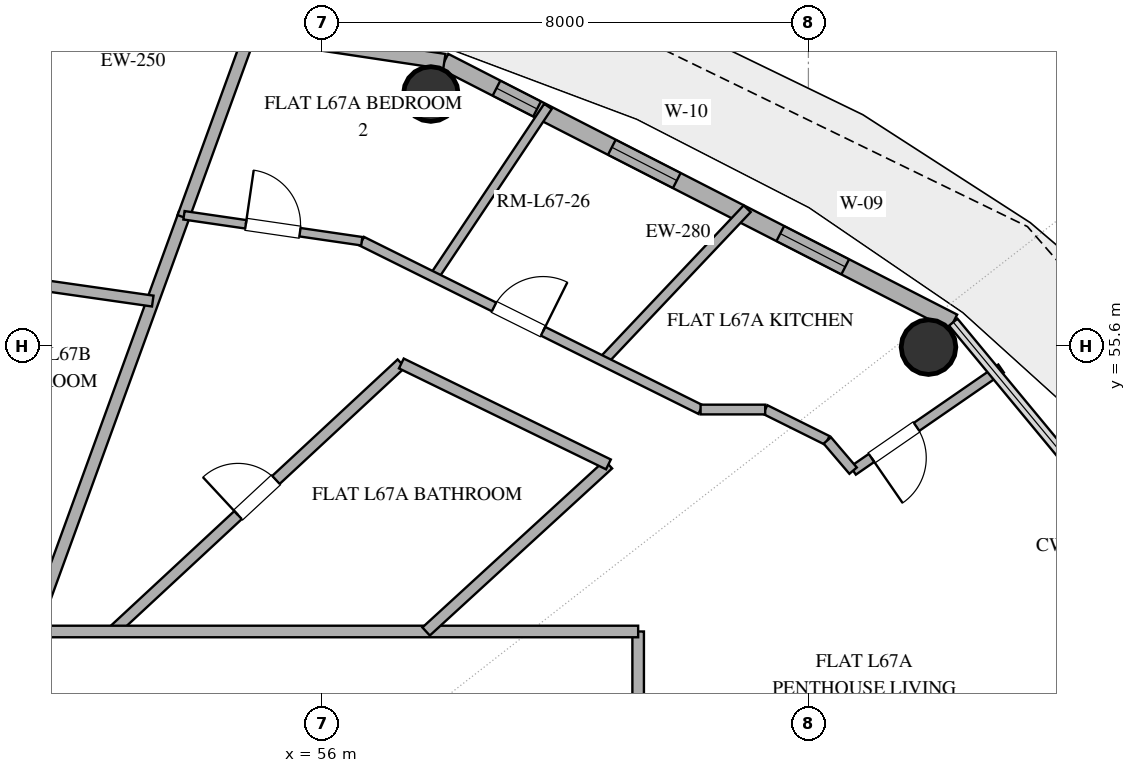
"""IFC4 building model, lengths in metres.
Left out: names, types, materials, properties, quantities, classifications, styles, units other than length and angle.
Written with IfcOpenShell. Run it as: python <this file> out.ifc"""

import sys

from ifc_helpers import new_model, si_unit, direction, frame, frame_2d, origin, origin_2d, place, context, subcontext, project, spatial, rectangle, hollow_circle, extrude, element, fill, save


model = new_model("IFC4")
c1 = context("Model", 3, precision=1e-05, world=origin(), true_north=direction((0.0, 1.0)))
c2 = subcontext(c1, "Body", "Model", "MODEL_VIEW")
j1 = project(units=[si_unit("LENGTHUNIT", "METRE"), si_unit("PLANEANGLEUNIT", "RADIAN")], contexts=[c1])
p1 = place(None, origin())
s1 = spatial("IfcSite", under=j1, at=p1, CompositionType="ELEMENT")
p2 = place(p1, origin())
s2 = spatial("IfcBuilding", under=s1, at=p2, CompositionType="ELEMENT")
p3 = place(p2, frame((0.0, 0.0, 262.2)))
s3 = spatial("IfcBuildingStorey", under=s2, at=p3, CompositionType="ELEMENT", Elevation=262.2)
for number, where, z_axis, x_axis in (
    (1, (65.975, 55.576, 0.0), (0.0, 0.0, 1.0), (1.0, 0.0, 0.0)),
    (2, (57.791, 59.739, 0.0), (0.0, 0.0, 1.0), (1.0, 0.0, 0.0)),
):
    element("IfcColumn", number, at=place(p3, frame(where, z_axis=z_axis, x_axis=x_axis)), inside=s3, PredefinedType="COLUMN", context=c2, shape_type="SweptSolid", body=[
        extrude(hollow_circle(Radius=0.45, WallThickness=0.025, at=origin_2d()), origin(), (0.0, 0.0, 1.0), 3.37),
    ])
p4 = place(p3, frame((66.383, 55.987, 0.0), z_axis=(0.0, 0.0, 1.0), x_axis=(-0.890007394051, 0.455946091699, 0.0)))
e3 = element("IfcWall", 3, at=p4, inside=s3, PredefinedType="SOLIDWALL", context=c2, shape_type="SweptSolid", body=[
    extrude(rectangle(XDim=9.404, YDim=0.28, at=frame_2d((4.702, 0.0))), origin(), (0.0, 0.0, 1.0), 3.37),
])
p5 = place(p4, frame((1.996, 0.0, 0.85)))
e4 = element("IfcOpeningElement", 4, at=p5, cuts=e3, PredefinedType="OPENING", context=c2, shape_type="SweptSolid", body=[
    extrude(rectangle(XDim=1.2, YDim=1.8, at=frame_2d((0.6, 0.9))), frame((0.0, 0.15, 0.0), z_axis=(0.0, -1.0, 0.0), x_axis=(1.0, 0.0, 0.0)), (0.0, 0.0, 1.0), 0.3),
])
p6 = place(p4, frame((5.109, 0.0, 0.85)))
e5 = element("IfcOpeningElement", 5, at=p6, cuts=e3, PredefinedType="OPENING", context=c2, shape_type="SweptSolid", body=[
    extrude(rectangle(XDim=1.2, YDim=1.6, at=frame_2d((0.6, 0.8))), frame((0.0, 0.15, 0.0), z_axis=(0.0, -1.0, 0.0), x_axis=(1.0, 0.0, 0.0)), (0.0, 0.0, 1.0), 0.3),
])
p7 = place(p4, frame((7.691, 0.0, 0.85)))
e6 = element("IfcOpeningElement", 6, at=p7, cuts=e3, PredefinedType="OPENING", context=c2, shape_type="SweptSolid", body=[
    extrude(rectangle(XDim=0.75, YDim=1.8, at=frame_2d((0.375, 0.9))), frame((0.0, 0.15, 0.0), z_axis=(0.0, -1.0, 0.0), x_axis=(1.0, 0.0, 0.0)), (0.0, 0.0, 1.0), 0.3),
])
p8 = place(p3, frame((58.013, 60.274, 0.0), z_axis=(0.0, 0.0, 1.0), x_axis=(-0.988882522213, 0.148698881169, 0.0)))
e7 = element("IfcWall", 7, at=p8, inside=s3, PredefinedType="SOLIDWALL", context=c2, shape_type="SweptSolid", body=[
    extrude(rectangle(XDim=10.125, YDim=0.25, at=frame_2d((5.062, 0.0))), origin(), (0.0, 0.0, 1.0), 3.37),
])
p9 = place(p8, frame((6.614, 0.0, 1.42)))
e8 = element("IfcOpeningElement", 8, at=p9, cuts=e7, PredefinedType="OPENING", context=c2, shape_type="SweptSolid", body=[
    extrude(rectangle(XDim=1.0, YDim=1.05, at=frame_2d((0.5, 0.525))), frame((0.0, 0.135, 0.0), z_axis=(0.0, -1.0, 0.0), x_axis=(1.0, 0.0, 0.0)), (0.0, 0.0, 1.0), 0.27),
])
p10 = place(p3, frame((52.558, 50.9, 0.0), z_axis=(0.0, 0.0, 1.0), x_axis=(0.732849863846, 0.68039038578, 0.0)))
e9 = element("IfcWall", 9, at=p10, inside=s3, PredefinedType="PLUMBINGWALL", context=c2, shape_type="SweptSolid", body=[
    extrude(rectangle(XDim=6.478, YDim=0.18, at=frame_2d((3.239, 0.0))), origin(), (0.0, 0.0, 1.0), 2.73),
])
p11 = place(p10, frame((2.814, 0.0, 0.0)))
e10 = element("IfcOpeningElement", 10, at=p11, cuts=e9, PredefinedType="OPENING", context=c2, shape_type="SweptSolid", body=[
    extrude(rectangle(XDim=0.85, YDim=2.1, at=frame_2d((0.425, 1.05))), frame((0.0, 0.1, 0.0), z_axis=(0.0, -1.0, 0.0), x_axis=(1.0, 0.0, 0.0)), (0.0, 0.0, 1.0), 0.2),
])
p12 = place(p3, frame((51.239, 50.9, 0.0), z_axis=(0.0, 0.0, 1.0), x_axis=(0.342027045015, 0.939690108748, 0.0)))
e11 = element("IfcWall", 11, at=p12, inside=s3, PredefinedType="PARTITIONING", context=c2, shape_type="SweptSolid", body=[
    extrude(rectangle(XDim=7.316, YDim=0.2, at=frame_2d((3.658, 0.0))), origin(), (0.0, 0.0, 1.0), 2.73),
])
p13 = place(p3, frame((61.2, 50.9, 0.0), z_axis=(0.0, 0.0, 1.0), x_axis=(0.0, -1.0, 0.0)))
e12 = element("IfcWall", 12, at=p13, inside=s3, PredefinedType="PARTITIONING", context=c2, shape_type="SweptSolid", body=[
    extrude(rectangle(XDim=12.47, YDim=0.19, at=frame_2d((6.235, 0.0))), origin(), (0.0, 0.0, 1.0), 2.73),
])
p14 = place(p13, frame((2.198, 0.0, 0.0)))
e13 = element("IfcOpeningElement", 13, at=p14, cuts=e12, PredefinedType="OPENING", context=c2, shape_type="SweptSolid", body=[
    extrude(rectangle(XDim=1.0, YDim=2.2, at=frame_2d((0.5, 1.1))), frame((0.0, 0.105, 0.0), z_axis=(0.0, -1.0, 0.0), x_axis=(1.0, 0.0, 0.0)), (0.0, 0.0, 1.0), 0.21),
])
p15 = place(p13, frame((7.38, 0.0, 0.0)))
e14 = element("IfcOpeningElement", 14, at=p15, cuts=e12, PredefinedType="OPENING", context=c2, shape_type="SweptSolid", body=[
    extrude(rectangle(XDim=1.0, YDim=2.2, at=frame_2d((0.5, 1.1))), frame((0.0, 0.105, 0.0), z_axis=(0.0, -1.0, 0.0), x_axis=(1.0, 0.0, 0.0)), (0.0, 0.0, 1.0), 0.21),
])
p16 = place(p3, frame((51.205, 50.9, 0.0), z_axis=(0.0, 0.0, 1.0), x_axis=(1.0, 0.0, 0.0)))
e15 = element("IfcWall", 15, at=p16, inside=s3, PredefinedType="PARTITIONING", context=c2, shape_type="SweptSolid", body=[
    extrude(rectangle(XDim=9.995, YDim=0.19, at=frame_2d((4.998, 0.0))), origin(), (0.0, 0.0, 1.0), 2.73),
])
p17 = place(p3, frame((49.036, 56.932, 0.0), z_axis=(0.0, 0.0, 1.0), x_axis=(0.989927514161, -0.141575127434, 0.0)))
e16 = element("IfcWall", 16, at=p17, inside=s3, PredefinedType="PLUMBINGWALL", context=c2, shape_type="SweptSolid", body=[
    extrude(rectangle(XDim=4.223, YDim=0.18, at=frame_2d((2.112, 0.0))), origin(), (0.0, 0.0, 1.0), 2.73),
])
p18 = place(p3, frame((60.711, 53.648, 0.0), z_axis=(0.0, 0.0, 1.0), x_axis=(-0.737258783223, -0.675610454745, 0.0)))
e17 = element("IfcWall", 17, at=p18, inside=s3, PredefinedType="PLUMBINGWALL", context=c2, shape_type="SweptSolid", body=[
    extrude(rectangle(XDim=4.067, YDim=0.18, at=frame_2d((2.034, 0.0))), origin(), (0.0, 0.0, 1.0), 2.73),
])
p19 = place(p3, frame((57.305, 55.308, 0.0), z_axis=(0.0, 0.0, 1.0), x_axis=(0.898917645735, -0.438117639667, 0.0)))
e18 = element("IfcWall", 18, at=p19, inside=s3, PredefinedType="PLUMBINGWALL", context=c2, shape_type="SweptSolid", body=[
    extrude(rectangle(XDim=3.789, YDim=0.18, at=frame_2d((1.895, 0.0))), origin(), (0.0, 0.0, 1.0), 2.73),
])
p20 = place(p3, frame((60.623, 55.347, 0.0), z_axis=(0.0, 0.0, 1.0), x_axis=(0.687190766796, 0.726477012734, 0.0)))
e19 = element("IfcWall", 19, at=p20, inside=s3, PredefinedType="PLUMBINGWALL", context=c2, shape_type="SweptSolid", body=[
    extrude(rectangle(XDim=3.449, YDim=0.16, at=frame_2d((1.725, 0.0))), origin(), (0.0, 0.0, 1.0), 2.73),
])
p21 = place(p3, frame((59.717, 59.535, 0.0), z_axis=(0.0, 0.0, 1.0), x_axis=(-0.555567743092, -0.831471276013, 0.0)))
e20 = element("IfcWall", 20, at=p21, inside=s3, PredefinedType="PARTITIONING", context=c2, shape_type="SweptSolid", body=[
    extrude(rectangle(XDim=3.376, YDim=0.15, at=frame_2d((1.688, 0.0))), origin(), (0.0, 0.0, 1.0), 2.73),
])
p22 = place(p3, frame((54.867, 60.866, 0.0), z_axis=(0.0, 0.0, 1.0), x_axis=(-0.342000121366, -0.939699907942, 0.0)))
e21 = element("IfcWall", 21, at=p22, inside=s3, PredefinedType="PARTITIONING", context=c2, shape_type="SweptSolid", body=[
    extrude(rectangle(XDim=3.355, YDim=0.2, at=frame_2d((1.678, 0.0))), origin(), (0.0, 0.0, 1.0), 2.73),
])
p23 = place(p3, frame((56.655, 57.318, 0.0), z_axis=(0.0, 0.0, 1.0), x_axis=(0.89555447129, -0.444951895099, 0.0)))
e22 = element("IfcWall", 22, at=p23, inside=s3, PredefinedType="PLUMBINGWALL", context=c2, shape_type="SweptSolid", body=[
    extrude(rectangle(XDim=6.222, YDim=0.16, at=frame_2d((3.111, 0.0))), origin(), (0.0, 0.0, 1.0), 2.73),
])
p24 = place(p23, frame((2.428, 0.0, 0.0)))
e23 = element("IfcOpeningElement", 23, at=p24, cuts=e22, PredefinedType="OPENING", context=c2, shape_type="SweptSolid", body=[
    extrude(rectangle(XDim=0.9, YDim=2.1, at=frame_2d((0.45, 1.05))), frame((0.0, 0.09, 0.0), z_axis=(0.0, -1.0, 0.0), x_axis=(1.0, 0.0, 0.0)), (0.0, 0.0, 1.0), 0.18),
])
p25 = place(p3, frame((67.169, 55.224, 0.0), z_axis=(0.0, 0.0, 1.0), x_axis=(-0.823115625857, -0.567873812101, 0.0)))
e24 = element("IfcWall", 24, at=p25, inside=s3, PredefinedType="PLUMBINGWALL", context=c2, shape_type="SweptSolid", body=[
    extrude(rectangle(XDim=2.957, YDim=0.16, at=frame_2d((1.478, 0.0))), origin(), (0.0, 0.0, 1.0), 2.73),
])
p26 = place(p25, frame((1.688, 0.0, 0.0)))
e25 = element("IfcOpeningElement", 25, at=p26, cuts=e24, PredefinedType="OPENING", context=c2, shape_type="SweptSolid", body=[
    extrude(rectangle(XDim=0.9, YDim=2.1, at=frame_2d((0.45, 1.05))), frame((0.0, 0.09, 0.0), z_axis=(0.0, -1.0, 0.0), x_axis=(1.0, 0.0, 0.0)), (0.0, 0.0, 1.0), 0.18),
])
p27 = place(p3, frame((53.73, 57.744, 0.0), z_axis=(0.0, 0.0, 1.0), x_axis=(0.989530523264, -0.144323745545, 0.0)))
e26 = element("IfcWall", 26, at=p27, inside=s3, PredefinedType="PARTITIONING", context=c2, shape_type="SweptSolid", body=[
    extrude(rectangle(XDim=2.955, YDim=0.14, at=frame_2d((1.478, 0.0))), origin(), (0.0, 0.0, 1.0), 2.73),
])
p28 = place(p27, frame((1.028, 0.0, 0.0)))
e27 = element("IfcOpeningElement", 27, at=p28, cuts=e26, PredefinedType="OPENING", context=c2, shape_type="SweptSolid", body=[
    extrude(rectangle(XDim=0.9, YDim=2.1, at=frame_2d((0.45, 1.05))), frame((0.0, 0.08, 0.0), z_axis=(0.0, -1.0, 0.0), x_axis=(1.0, 0.0, 0.0)), (0.0, 0.0, 1.0), 0.16),
])
p29 = place(p3, frame((64.311, 54.042, 0.0), z_axis=(0.0, 0.0, 1.0), x_axis=(-0.895409226325, 0.445244109912, 0.0)))
e28 = element("IfcWall", 28, at=p29, inside=s3, PredefinedType="PLUMBINGWALL", context=c2, shape_type="SweptSolid", body=[
    extrude(rectangle(XDim=1.141, YDim=0.16, at=frame_2d((0.571, 0.0))), origin(), (0.0, 0.0, 1.0), 2.73),
])
p30 = place(p3, frame((63.289, 54.55, 0.0), z_axis=(0.0, 0.0, 1.0), x_axis=(-1.0, 0.0, 0.0)))
e29 = element("IfcWall", 29, at=p30, inside=s3, PredefinedType="PLUMBINGWALL", context=c2, shape_type="SweptSolid", body=[
    extrude(rectangle(XDim=1.062, YDim=0.16, at=frame_2d((0.531, 0.0))), origin(), (0.0, 0.0, 1.0), 2.73),
])
p31 = place(p3, frame((64.735, 53.545, 0.0), z_axis=(0.0, 0.0, 1.0), x_axis=(-0.649220192727, 0.760600513644, 0.0)))
e30 = element("IfcWall", 30, at=p31, inside=s3, PredefinedType="PLUMBINGWALL", context=c2, shape_type="SweptSolid", body=[
    extrude(rectangle(XDim=0.653, YDim=0.16, at=frame_2d((0.327, 0.0))), origin(), (0.0, 0.0, 1.0), 2.73),
])
p32 = place(p5, origin())
e31 = element("IfcWindow", 31, at=p32, inside=s3, PartitioningType="SINGLE_PANEL", PredefinedType="WINDOW", context=c2, shape_type="SweptSolid", body=[
    extrude(rectangle(XDim=1.2, YDim=1.8, at=frame_2d((0.6, 0.9))), frame((0.0, 0.03, 0.0), z_axis=(0.0, -1.0, 0.0), x_axis=(1.0, 0.0, 0.0)), (0.0, 0.0, 1.0), 0.06),
])
fill(e4, e31)
p33 = place(p6, origin())
e32 = element("IfcWindow", 32, at=p33, inside=s3, PartitioningType="SINGLE_PANEL", PredefinedType="WINDOW", context=c2, shape_type="SweptSolid", body=[
    extrude(rectangle(XDim=1.2, YDim=1.6, at=frame_2d((0.6, 0.8))), frame((0.0, 0.03, 0.0), z_axis=(0.0, -1.0, 0.0), x_axis=(1.0, 0.0, 0.0)), (0.0, 0.0, 1.0), 0.06),
])
fill(e5, e32)
p34 = place(p7, origin())
e33 = element("IfcWindow", 33, at=p34, inside=s3, PartitioningType="SINGLE_PANEL", PredefinedType="WINDOW", context=c2, shape_type="SweptSolid", body=[
    extrude(rectangle(XDim=0.75, YDim=1.8, at=frame_2d((0.375, 0.9))), frame((0.0, 0.03, 0.0), z_axis=(0.0, -1.0, 0.0), x_axis=(1.0, 0.0, 0.0)), (0.0, 0.0, 1.0), 0.06),
])
fill(e6, e33)
p35 = place(p11, origin())
e34 = element("IfcDoor", 34, at=p35, inside=s3, OperationType="SINGLE_SWING_LEFT", PredefinedType="DOOR", context=c2, shape_type="SweptSolid", body=[
    extrude(rectangle(XDim=0.85, YDim=2.1, at=frame_2d((0.425, 1.05))), frame((0.0, 0.025, 0.0), z_axis=(0.0, -1.0, 0.0), x_axis=(1.0, 0.0, 0.0)), (0.0, 0.0, 1.0), 0.05),
])
fill(e10, e34)
p36 = place(p24, origin())
e35 = element("IfcDoor", 35, at=p36, inside=s3, OperationType="SINGLE_SWING_RIGHT", PredefinedType="DOOR", context=c2, shape_type="SweptSolid", body=[
    extrude(rectangle(XDim=0.9, YDim=2.1, at=frame_2d((0.45, 1.05))), frame((0.0, 0.025, 0.0), z_axis=(0.0, -1.0, 0.0), x_axis=(1.0, 0.0, 0.0)), (0.0, 0.0, 1.0), 0.05),
])
fill(e23, e35)
p37 = place(p26, origin())
e36 = element("IfcDoor", 36, at=p37, inside=s3, OperationType="SINGLE_SWING_RIGHT", PredefinedType="DOOR", context=c2, shape_type="SweptSolid", body=[
    extrude(rectangle(XDim=0.9, YDim=2.1, at=frame_2d((0.45, 1.05))), frame((0.0, 0.025, 0.0), z_axis=(0.0, -1.0, 0.0), x_axis=(1.0, 0.0, 0.0)), (0.0, 0.0, 1.0), 0.05),
])
fill(e25, e36)
p38 = place(p28, origin())
e37 = element("IfcDoor", 37, at=p38, inside=s3, OperationType="SINGLE_SWING_LEFT", PredefinedType="DOOR", context=c2, shape_type="SweptSolid", body=[
    extrude(rectangle(XDim=0.9, YDim=2.1, at=frame_2d((0.45, 1.05))), frame((0.0, 0.025, 0.0), z_axis=(0.0, -1.0, 0.0), x_axis=(1.0, 0.0, 0.0)), (0.0, 0.0, 1.0), 0.05),
])
fill(e27, e37)
save(model, sys.argv[1])
